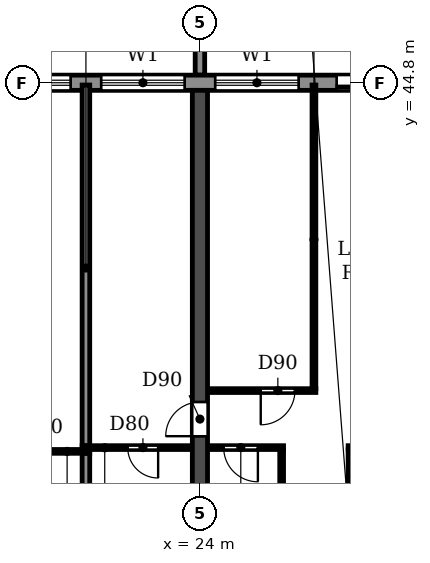
"""IFC4 building model, lengths in metres.
Left out: names, types, materials, properties, quantities, classifications, styles, units other than length and angle.
Written with IfcOpenShell. Run it as: python <this file> out.ifc"""

import sys

from ifc_helpers import new_model, si_unit, direction, frame, frame_2d, origin, place, context, subcontext, project, spatial, polyline, rectangle, outline, extrude, source, transform, mapped, element, fill, save


model = new_model("IFC4")
c1 = context("Model", 3, precision=1e-05, world=origin(), true_north=direction((0.0, 1.0)))
c2 = subcontext(c1, "Body", "Model", "MODEL_VIEW")
j1 = project(units=[si_unit("LENGTHUNIT", "METRE"), si_unit("PLANEANGLEUNIT", "RADIAN")], contexts=[c1])
p1 = place(None, origin())
s1 = spatial("IfcSite", under=j1, at=p1, CompositionType="ELEMENT")
p2 = place(p1, origin())
s2 = spatial("IfcBuilding", under=s1, at=p2, CompositionType="ELEMENT")
p3 = place(p2, frame((0.0, 0.0, 33.3)))
s3 = spatial("IfcBuildingStorey", under=s2, at=p3, CompositionType="ELEMENT", Elevation=33.3)
p4 = place(p3, frame((24.0, 30.55, 0.0), z_axis=(0.0, 0.0, 1.0), x_axis=(0.0, 1.0, 0.0)))
e1 = element("IfcWall", 1, at=p4, inside=s3, PredefinedType="SHEAR", context=c2, shape_type="SweptSolid", body=[
    extrude(rectangle(XDim=14.05, YDim=0.4, at=frame_2d((7.025, 0.0))), origin(), (0.0, 0.0, 1.0), 3.05),
])
p5 = place(p4, frame((4.95, 0.0, 0.0)))
e2 = element("IfcOpeningElement", 2, at=p5, cuts=e1, PredefinedType="OPENING", context=c2, shape_type="SweptSolid", body=[
    extrude(rectangle(XDim=0.9, YDim=2.1, at=frame_2d((0.45, 1.05))), frame((0.0, 0.21, 0.0), z_axis=(0.0, -1.0, 0.0), x_axis=(1.0, 0.0, 0.0)), (0.0, 0.0, 1.0), 0.42),
])
p6 = place(p3, frame((97.317, 44.8, 0.0), z_axis=(0.0, 0.0, 1.0), x_axis=(-1.0, 0.0, 0.0)))
e3 = element("IfcWall", 3, at=p6, inside=s3, PredefinedType="STANDARD", context=c2, shape_type="SweptSolid", body=[
    extrude(rectangle(XDim=92.634, YDim=0.4, at=frame_2d((46.317, 0.0))), origin(), (0.0, 0.0, 1.0), 3.05),
])
p7 = place(p6, frame((88.717, 0.0, 0.9)))
e4 = element("IfcOpeningElement", 4, at=p7, cuts=e3, PredefinedType="OPENING", context=c2, shape_type="SweptSolid", body=[
    extrude(rectangle(XDim=2.2, YDim=1.5, at=frame_2d((1.1, 0.75))), frame((0.0, 0.21, 0.0), z_axis=(0.0, -1.0, 0.0), x_axis=(1.0, 0.0, 0.0)), (0.0, 0.0, 1.0), 0.42),
])
p8 = place(p6, frame((85.917, 0.0, 0.0)))
e5 = element("IfcOpeningElement", 5, at=p8, cuts=e3, PredefinedType="OPENING", context=c2, shape_type="SweptSolid", body=[
    extrude(rectangle(XDim=1.8, YDim=2.4, at=frame_2d((0.9, 1.2))), frame((0.0, 0.21, 0.0), z_axis=(0.0, -1.0, 0.0), x_axis=(1.0, 0.0, 0.0)), (0.0, 0.0, 1.0), 0.42),
])
p9 = place(p6, frame((82.717, 0.0, 0.9)))
e6 = element("IfcOpeningElement", 6, at=p9, cuts=e3, PredefinedType="OPENING", context=c2, shape_type="SweptSolid", body=[
    extrude(rectangle(XDim=2.2, YDim=1.5, at=frame_2d((1.1, 0.75))), frame((0.0, 0.21, 0.0), z_axis=(0.0, -1.0, 0.0), x_axis=(1.0, 0.0, 0.0)), (0.0, 0.0, 1.0), 0.42),
])
p10 = place(p6, frame((79.917, 0.0, 0.0)))
e7 = element("IfcOpeningElement", 7, at=p10, cuts=e3, PredefinedType="OPENING", context=c2, shape_type="SweptSolid", body=[
    extrude(rectangle(XDim=1.8, YDim=2.4, at=frame_2d((0.9, 1.2))), frame((0.0, 0.21, 0.0), z_axis=(0.0, -1.0, 0.0), x_axis=(1.0, 0.0, 0.0)), (0.0, 0.0, 1.0), 0.42),
])
p11 = place(p6, frame((76.717, 0.0, 0.9)))
e8 = element("IfcOpeningElement", 8, at=p11, cuts=e3, PredefinedType="OPENING", context=c2, shape_type="SweptSolid", body=[
    extrude(rectangle(XDim=2.2, YDim=1.5, at=frame_2d((1.1, 0.75))), frame((0.0, 0.21, 0.0), z_axis=(0.0, -1.0, 0.0), x_axis=(1.0, 0.0, 0.0)), (0.0, 0.0, 1.0), 0.42),
])
p12 = place(p6, frame((73.717, 0.0, 0.9)))
e9 = element("IfcOpeningElement", 9, at=p12, cuts=e3, PredefinedType="OPENING", context=c2, shape_type="SweptSolid", body=[
    extrude(rectangle(XDim=2.2, YDim=1.5, at=frame_2d((1.1, 0.75))), frame((0.0, 0.21, 0.0), z_axis=(0.0, -1.0, 0.0), x_axis=(1.0, 0.0, 0.0)), (0.0, 0.0, 1.0), 0.42),
])
p13 = place(p6, frame((70.717, 0.0, 0.9)))
e10 = element("IfcOpeningElement", 10, at=p13, cuts=e3, PredefinedType="OPENING", context=c2, shape_type="SweptSolid", body=[
    extrude(rectangle(XDim=2.2, YDim=1.5, at=frame_2d((1.1, 0.75))), frame((0.0, 0.21, 0.0), z_axis=(0.0, -1.0, 0.0), x_axis=(1.0, 0.0, 0.0)), (0.0, 0.0, 1.0), 0.42),
])
p14 = place(p6, frame((67.917, 0.0, 0.0)))
e11 = element("IfcOpeningElement", 11, at=p14, cuts=e3, PredefinedType="OPENING", context=c2, shape_type="SweptSolid", body=[
    extrude(rectangle(XDim=1.8, YDim=2.4, at=frame_2d((0.9, 1.2))), frame((0.0, 0.21, 0.0), z_axis=(0.0, -1.0, 0.0), x_axis=(1.0, 0.0, 0.0)), (0.0, 0.0, 1.0), 0.42),
])
p15 = place(p6, frame((64.717, 0.0, 0.9)))
e12 = element("IfcOpeningElement", 12, at=p15, cuts=e3, PredefinedType="OPENING", context=c2, shape_type="SweptSolid", body=[
    extrude(rectangle(XDim=2.2, YDim=1.5, at=frame_2d((1.1, 0.75))), frame((0.0, 0.21, 0.0), z_axis=(0.0, -1.0, 0.0), x_axis=(1.0, 0.0, 0.0)), (0.0, 0.0, 1.0), 0.42),
])
p16 = place(p6, frame((61.717, 0.0, 0.9)))
e13 = element("IfcOpeningElement", 13, at=p16, cuts=e3, PredefinedType="OPENING", context=c2, shape_type="SweptSolid", body=[
    extrude(rectangle(XDim=2.2, YDim=1.5, at=frame_2d((1.1, 0.75))), frame((0.0, 0.21, 0.0), z_axis=(0.0, -1.0, 0.0), x_axis=(1.0, 0.0, 0.0)), (0.0, 0.0, 1.0), 0.42),
])
p17 = place(p6, frame((58.717, 0.0, 0.9)))
e14 = element("IfcOpeningElement", 14, at=p17, cuts=e3, PredefinedType="OPENING", context=c2, shape_type="SweptSolid", body=[
    extrude(rectangle(XDim=2.2, YDim=1.5, at=frame_2d((1.1, 0.75))), frame((0.0, 0.21, 0.0), z_axis=(0.0, -1.0, 0.0), x_axis=(1.0, 0.0, 0.0)), (0.0, 0.0, 1.0), 0.42),
])
p18 = place(p6, frame((55.917, 0.0, 0.0)))
e15 = element("IfcOpeningElement", 15, at=p18, cuts=e3, PredefinedType="OPENING", context=c2, shape_type="SweptSolid", body=[
    extrude(rectangle(XDim=1.8, YDim=2.4, at=frame_2d((0.9, 1.2))), frame((0.0, 0.21, 0.0), z_axis=(0.0, -1.0, 0.0), x_axis=(1.0, 0.0, 0.0)), (0.0, 0.0, 1.0), 0.42),
])
p19 = place(p6, frame((52.717, 0.0, 0.9)))
e16 = element("IfcOpeningElement", 16, at=p19, cuts=e3, PredefinedType="OPENING", context=c2, shape_type="SweptSolid", body=[
    extrude(rectangle(XDim=2.2, YDim=1.5, at=frame_2d((1.1, 0.75))), frame((0.0, 0.21, 0.0), z_axis=(0.0, -1.0, 0.0), x_axis=(1.0, 0.0, 0.0)), (0.0, 0.0, 1.0), 0.42),
])
p20 = place(p6, frame((49.717, 0.0, 0.9)))
e17 = element("IfcOpeningElement", 17, at=p20, cuts=e3, PredefinedType="OPENING", context=c2, shape_type="SweptSolid", body=[
    extrude(rectangle(XDim=2.2, YDim=1.5, at=frame_2d((1.1, 0.75))), frame((0.0, 0.21, 0.0), z_axis=(0.0, -1.0, 0.0), x_axis=(1.0, 0.0, 0.0)), (0.0, 0.0, 1.0), 0.42),
])
p21 = place(p6, frame((46.717, 0.0, 0.9)))
e18 = element("IfcOpeningElement", 18, at=p21, cuts=e3, PredefinedType="OPENING", context=c2, shape_type="SweptSolid", body=[
    extrude(rectangle(XDim=2.2, YDim=1.5, at=frame_2d((1.1, 0.75))), frame((0.0, 0.21, 0.0), z_axis=(0.0, -1.0, 0.0), x_axis=(1.0, 0.0, 0.0)), (0.0, 0.0, 1.0), 0.42),
])
p22 = place(p6, frame((43.917, 0.0, 0.0)))
e19 = element("IfcOpeningElement", 19, at=p22, cuts=e3, PredefinedType="OPENING", context=c2, shape_type="SweptSolid", body=[
    extrude(rectangle(XDim=1.8, YDim=2.4, at=frame_2d((0.9, 1.2))), frame((0.0, 0.21, 0.0), z_axis=(0.0, -1.0, 0.0), x_axis=(1.0, 0.0, 0.0)), (0.0, 0.0, 1.0), 0.42),
])
p23 = place(p6, frame((40.717, 0.0, 0.9)))
e20 = element("IfcOpeningElement", 20, at=p23, cuts=e3, PredefinedType="OPENING", context=c2, shape_type="SweptSolid", body=[
    extrude(rectangle(XDim=2.2, YDim=1.5, at=frame_2d((1.1, 0.75))), frame((0.0, 0.21, 0.0), z_axis=(0.0, -1.0, 0.0), x_axis=(1.0, 0.0, 0.0)), (0.0, 0.0, 1.0), 0.42),
])
p24 = place(p6, frame((37.717, 0.0, 0.9)))
e21 = element("IfcOpeningElement", 21, at=p24, cuts=e3, PredefinedType="OPENING", context=c2, shape_type="SweptSolid", body=[
    extrude(rectangle(XDim=2.2, YDim=1.5, at=frame_2d((1.1, 0.75))), frame((0.0, 0.21, 0.0), z_axis=(0.0, -1.0, 0.0), x_axis=(1.0, 0.0, 0.0)), (0.0, 0.0, 1.0), 0.42),
])
p25 = place(p6, frame((34.717, 0.0, 0.9)))
e22 = element("IfcOpeningElement", 22, at=p25, cuts=e3, PredefinedType="OPENING", context=c2, shape_type="SweptSolid", body=[
    extrude(rectangle(XDim=2.2, YDim=1.5, at=frame_2d((1.1, 0.75))), frame((0.0, 0.21, 0.0), z_axis=(0.0, -1.0, 0.0), x_axis=(1.0, 0.0, 0.0)), (0.0, 0.0, 1.0), 0.42),
])
p26 = place(p6, frame((31.917, 0.0, 0.0)))
e23 = element("IfcOpeningElement", 23, at=p26, cuts=e3, PredefinedType="OPENING", context=c2, shape_type="SweptSolid", body=[
    extrude(rectangle(XDim=1.8, YDim=2.4, at=frame_2d((0.9, 1.2))), frame((0.0, 0.21, 0.0), z_axis=(0.0, -1.0, 0.0), x_axis=(1.0, 0.0, 0.0)), (0.0, 0.0, 1.0), 0.42),
])
p27 = place(p6, frame((28.717, 0.0, 0.9)))
e24 = element("IfcOpeningElement", 24, at=p27, cuts=e3, PredefinedType="OPENING", context=c2, shape_type="SweptSolid", body=[
    extrude(rectangle(XDim=2.2, YDim=1.5, at=frame_2d((1.1, 0.75))), frame((0.0, 0.21, 0.0), z_axis=(0.0, -1.0, 0.0), x_axis=(1.0, 0.0, 0.0)), (0.0, 0.0, 1.0), 0.42),
])
p28 = place(p6, frame((25.717, 0.0, 0.9)))
e25 = element("IfcOpeningElement", 25, at=p28, cuts=e3, PredefinedType="OPENING", context=c2, shape_type="SweptSolid", body=[
    extrude(rectangle(XDim=2.2, YDim=1.5, at=frame_2d((1.1, 0.75))), frame((0.0, 0.21, 0.0), z_axis=(0.0, -1.0, 0.0), x_axis=(1.0, 0.0, 0.0)), (0.0, 0.0, 1.0), 0.42),
])
p29 = place(p6, frame((22.917, 0.0, 0.0)))
e26 = element("IfcOpeningElement", 26, at=p29, cuts=e3, PredefinedType="OPENING", context=c2, shape_type="SweptSolid", body=[
    extrude(rectangle(XDim=1.8, YDim=2.4, at=frame_2d((0.9, 1.2))), frame((0.0, 0.21, 0.0), z_axis=(0.0, -1.0, 0.0), x_axis=(1.0, 0.0, 0.0)), (0.0, 0.0, 1.0), 0.42),
])
p30 = place(p6, frame((19.717, 0.0, 0.9)))
e27 = element("IfcOpeningElement", 27, at=p30, cuts=e3, PredefinedType="OPENING", context=c2, shape_type="SweptSolid", body=[
    extrude(rectangle(XDim=2.2, YDim=1.5, at=frame_2d((1.1, 0.75))), frame((0.0, 0.21, 0.0), z_axis=(0.0, -1.0, 0.0), x_axis=(1.0, 0.0, 0.0)), (0.0, 0.0, 1.0), 0.42),
])
p31 = place(p6, frame((16.717, 0.0, 0.9)))
e28 = element("IfcOpeningElement", 28, at=p31, cuts=e3, PredefinedType="OPENING", context=c2, shape_type="SweptSolid", body=[
    extrude(rectangle(XDim=2.2, YDim=1.5, at=frame_2d((1.1, 0.75))), frame((0.0, 0.21, 0.0), z_axis=(0.0, -1.0, 0.0), x_axis=(1.0, 0.0, 0.0)), (0.0, 0.0, 1.0), 0.42),
])
p32 = place(p6, frame((13.917, 0.0, 0.0)))
e29 = element("IfcOpeningElement", 29, at=p32, cuts=e3, PredefinedType="OPENING", context=c2, shape_type="SweptSolid", body=[
    extrude(rectangle(XDim=1.8, YDim=2.4, at=frame_2d((0.9, 1.2))), frame((0.0, 0.21, 0.0), z_axis=(0.0, -1.0, 0.0), x_axis=(1.0, 0.0, 0.0)), (0.0, 0.0, 1.0), 0.42),
])
p33 = place(p6, frame((10.717, 0.0, 0.9)))
e30 = element("IfcOpeningElement", 30, at=p33, cuts=e3, PredefinedType="OPENING", context=c2, shape_type="SweptSolid", body=[
    extrude(rectangle(XDim=2.2, YDim=1.5, at=frame_2d((1.1, 0.75))), frame((0.0, 0.21, 0.0), z_axis=(0.0, -1.0, 0.0), x_axis=(1.0, 0.0, 0.0)), (0.0, 0.0, 1.0), 0.42),
])
p34 = place(p6, frame((7.917, 0.0, 0.0)))
e31 = element("IfcOpeningElement", 31, at=p34, cuts=e3, PredefinedType="OPENING", context=c2, shape_type="SweptSolid", body=[
    extrude(rectangle(XDim=1.8, YDim=2.4, at=frame_2d((0.9, 1.2))), frame((0.0, 0.21, 0.0), z_axis=(0.0, -1.0, 0.0), x_axis=(1.0, 0.0, 0.0)), (0.0, 0.0, 1.0), 0.42),
])
p35 = place(p6, frame((4.717, 0.0, 0.9)))
e32 = element("IfcOpeningElement", 32, at=p35, cuts=e3, PredefinedType="OPENING", context=c2, shape_type="SweptSolid", body=[
    extrude(rectangle(XDim=2.2, YDim=1.5, at=frame_2d((1.1, 0.75))), frame((0.0, 0.21, 0.0), z_axis=(0.0, -1.0, 0.0), x_axis=(1.0, 0.0, 0.0)), (0.0, 0.0, 1.0), 0.42),
])
p36 = place(p6, frame((1.917, 0.0, 0.0)))
e33 = element("IfcOpeningElement", 33, at=p36, cuts=e3, PredefinedType="OPENING", context=c2, shape_type="SweptSolid", body=[
    extrude(rectangle(XDim=1.8, YDim=2.4, at=frame_2d((0.9, 1.2))), frame((0.0, 0.21, 0.0), z_axis=(0.0, -1.0, 0.0), x_axis=(1.0, 0.0, 0.0)), (0.0, 0.0, 1.0), 0.42),
])
m1 = source(origin(), c2, "Body", "SweptSolid", [
    extrude(outline(polyline([(0.0, 0.0), (0.25, 0.0), (0.25, 3.1), (0.0, 3.1), (0.0, 0.0)])), origin(), (0.0, 0.0, 1.0), 3.1),
])
p37 = place(p3, frame((23.875, 45.0, 0.0)))
e34 = element("IfcWall", 34, at=p37, inside=s3, PredefinedType="STANDARD", context=c2, shape_type="MappedRepresentation", body=[
    mapped(m1, transform((0.0, 0.0, 0.0))),
])
p38 = place(p3, frame((21.0, 30.56, 0.0), z_axis=(0.0, 0.0, 1.0), x_axis=(0.0, 1.0, 0.0)))
e35 = element("IfcWall", 35, at=p38, inside=s3, PredefinedType="PARTITIONING", context=c2, shape_type="SweptSolid", body=[
    extrude(rectangle(XDim=4.49, YDim=0.2, at=frame_2d((2.245, 0.0))), origin(), (0.0, 0.0, 1.0), 3.05),
])
p39 = place(p3, frame((21.0, 35.25, 0.0), z_axis=(0.0, 0.0, 1.0), x_axis=(0.0, 1.0, 0.0)))
e36 = element("IfcWall", 36, at=p39, inside=s3, PredefinedType="PARTITIONING", context=c2, shape_type="SweptSolid", body=[
    extrude(rectangle(XDim=9.49, YDim=0.2, at=frame_2d((4.745, 0.0))), origin(), (0.0, 0.0, 1.0), 3.05),
])
p40 = place(p3, frame((18.21, 35.1, 0.0), z_axis=(0.0, 0.0, 1.0), x_axis=(1.0, 0.0, 0.0)))
e37 = element("IfcWall", 37, at=p40, inside=s3, PredefinedType="PARTITIONING", context=c2, shape_type="SweptSolid", body=[
    extrude(rectangle(XDim=2.89, YDim=0.1, at=frame_2d((1.445, 0.0))), origin(), (0.0, 0.0, 1.0), 3.05),
])
p41 = place(p40, frame((0.89, 0.0, 0.0)))
e38 = element("IfcOpeningElement", 38, at=p41, cuts=e37, PredefinedType="OPENING", context=c2, shape_type="SweptSolid", body=[
    extrude(rectangle(XDim=0.8, YDim=2.1, at=frame_2d((0.4, 1.05))), frame((0.0, 0.06, 0.0), z_axis=(0.0, -1.0, 0.0), x_axis=(1.0, 0.0, 0.0)), (0.0, 0.0, 1.0), 0.12),
])
p42 = place(p3, frame((20.9, 35.2, 0.0), z_axis=(0.0, 0.0, 1.0), x_axis=(1.0, 0.0, 0.0)))
e39 = element("IfcWall", 39, at=p42, inside=s3, PredefinedType="PARTITIONING", context=c2, shape_type="SweptSolid", body=[
    extrude(rectangle(XDim=2.89, YDim=0.1, at=frame_2d((1.445, 0.0))), origin(), (0.0, 0.0, 1.0), 3.05),
])
p43 = place(p42, frame((1.2, 0.0, 0.0)))
e40 = element("IfcOpeningElement", 40, at=p43, cuts=e39, PredefinedType="OPENING", context=c2, shape_type="SweptSolid", body=[
    extrude(rectangle(XDim=0.8, YDim=2.1, at=frame_2d((0.4, 1.05))), frame((0.0, 0.06, 0.0), z_axis=(0.0, -1.0, 0.0), x_axis=(1.0, 0.0, 0.0)), (0.0, 0.0, 1.0), 0.12),
])
p44 = place(p3, frame((24.21, 35.2, 0.0), z_axis=(0.0, 0.0, 1.0), x_axis=(1.0, 0.0, 0.0)))
e41 = element("IfcWall", 41, at=p44, inside=s3, PredefinedType="PARTITIONING", context=c2, shape_type="SweptSolid", body=[
    extrude(rectangle(XDim=1.99, YDim=0.1, at=frame_2d((0.995, 0.0))), origin(), (0.0, 0.0, 1.0), 3.05),
])
p45 = place(p44, frame((0.415, 0.0, 0.0)))
e42 = element("IfcOpeningElement", 42, at=p45, cuts=e41, PredefinedType="OPENING", context=c2, shape_type="SweptSolid", body=[
    extrude(rectangle(XDim=0.9, YDim=2.1, at=frame_2d((0.45, 1.05))), frame((0.0, 0.06, 0.0), z_axis=(0.0, -1.0, 0.0), x_axis=(1.0, 0.0, 0.0)), (0.0, 0.0, 1.0), 0.12),
])
p46 = place(p3, frame((27.9, 35.2, 0.0), z_axis=(0.0, 0.0, 1.0), x_axis=(1.0, 0.0, 0.0)))
e43 = element("IfcWall", 43, at=p46, inside=s3, PredefinedType="PARTITIONING", context=c2, shape_type="SweptSolid", body=[
    extrude(rectangle(XDim=1.89, YDim=0.1, at=frame_2d((0.945, 0.0))), origin(), (0.0, 0.0, 1.0), 3.05),
])
p47 = place(p46, frame((0.675, 0.0, 0.0)))
e44 = element("IfcOpeningElement", 44, at=p47, cuts=e43, PredefinedType="OPENING", context=c2, shape_type="SweptSolid", body=[
    extrude(rectangle(XDim=0.8, YDim=2.1, at=frame_2d((0.4, 1.05))), frame((0.0, 0.06, 0.0), z_axis=(0.0, -1.0, 0.0), x_axis=(1.0, 0.0, 0.0)), (0.0, 0.0, 1.0), 0.12),
])
p48 = place(p3, frame((24.21, 36.7, 0.0), z_axis=(0.0, 0.0, 1.0), x_axis=(1.0, 0.0, 0.0)))
e45 = element("IfcWall", 45, at=p48, inside=s3, PredefinedType="PARTITIONING", context=c2, shape_type="SweptSolid", body=[
    extrude(rectangle(XDim=2.84, YDim=0.1, at=frame_2d((1.42, 0.0))), origin(), (0.0, 0.0, 1.0), 3.05),
])
p49 = place(p48, frame((1.39, 0.0, 0.0)))
e46 = element("IfcOpeningElement", 46, at=p49, cuts=e45, PredefinedType="OPENING", context=c2, shape_type="SweptSolid", body=[
    extrude(rectangle(XDim=0.9, YDim=2.1, at=frame_2d((0.45, 1.05))), frame((0.0, 0.06, 0.0), z_axis=(0.0, -1.0, 0.0), x_axis=(1.0, 0.0, 0.0)), (0.0, 0.0, 1.0), 0.12),
])
p50 = place(p3, frame((26.15, 30.56, 0.0), z_axis=(0.0, 0.0, 1.0), x_axis=(0.0, 1.0, 0.0)))
e47 = element("IfcWall", 47, at=p50, inside=s3, PredefinedType="PARTITIONING", context=c2, shape_type="SweptSolid", body=[
    extrude(rectangle(XDim=4.59, YDim=0.1, at=frame_2d((2.295, 0.0))), origin(), (0.0, 0.0, 1.0), 3.05),
])
p51 = place(p3, frame((27.0, 36.75, 0.0), z_axis=(0.0, 0.0, 1.0), x_axis=(0.0, 1.0, 0.0)))
e48 = element("IfcWall", 48, at=p51, inside=s3, PredefinedType="PARTITIONING", context=c2, shape_type="SweptSolid", body=[
    extrude(rectangle(XDim=7.99, YDim=0.1, at=frame_2d((3.995, 0.0))), origin(), (0.0, 0.0, 1.0), 3.05),
])
p52 = place(p3, frame((27.95, 30.56, 0.0), z_axis=(0.0, 0.0, 1.0), x_axis=(0.0, 1.0, 0.0)))
e49 = element("IfcWall", 49, at=p52, inside=s3, PredefinedType="PARTITIONING", context=c2, shape_type="SweptSolid", body=[
    extrude(rectangle(XDim=4.59, YDim=0.1, at=frame_2d((2.295, 0.0))), origin(), (0.0, 0.0, 1.0), 3.05),
])
p53 = place(p11, origin())
e50 = element("IfcWindow", 50, at=p53, inside=s3, PartitioningType="DOUBLE_PANEL_HORIZONTAL", PredefinedType="WINDOW", context=c2, shape_type="SweptSolid", body=[
    extrude(rectangle(XDim=2.2, YDim=1.5, at=frame_2d((1.1, 0.75))), frame((0.0, 0.03, 0.0), z_axis=(0.0, -1.0, 0.0), x_axis=(1.0, 0.0, 0.0)), (0.0, 0.0, 1.0), 0.06),
])
fill(e8, e50)
p54 = place(p12, origin())
e51 = element("IfcWindow", 51, at=p54, inside=s3, PartitioningType="DOUBLE_PANEL_HORIZONTAL", PredefinedType="WINDOW", context=c2, shape_type="SweptSolid", body=[
    extrude(rectangle(XDim=2.2, YDim=1.5, at=frame_2d((1.1, 0.75))), frame((0.0, 0.03, 0.0), z_axis=(0.0, -1.0, 0.0), x_axis=(1.0, 0.0, 0.0)), (0.0, 0.0, 1.0), 0.06),
])
fill(e9, e51)
p55 = place(p13, origin())
e52 = element("IfcWindow", 52, at=p55, inside=s3, PartitioningType="DOUBLE_PANEL_HORIZONTAL", PredefinedType="WINDOW", context=c2, shape_type="SweptSolid", body=[
    extrude(rectangle(XDim=2.2, YDim=1.5, at=frame_2d((1.1, 0.75))), frame((0.0, 0.03, 0.0), z_axis=(0.0, -1.0, 0.0), x_axis=(1.0, 0.0, 0.0)), (0.0, 0.0, 1.0), 0.06),
])
fill(e10, e52)
p56 = place(p14, origin())
e53 = element("IfcDoor", 53, at=p56, inside=s3, OperationType="DOUBLE_DOOR_SLIDING", PredefinedType="DOOR", context=c2, shape_type="SweptSolid", body=[
    extrude(rectangle(XDim=1.8, YDim=2.4, at=frame_2d((0.9, 1.2))), frame((0.0, 0.025, 0.0), z_axis=(0.0, -1.0, 0.0), x_axis=(1.0, 0.0, 0.0)), (0.0, 0.0, 1.0), 0.05),
])
fill(e11, e53)
p57 = place(p43, frame((0.8, 0.0, 0.0), z_axis=(0.0, 0.0, 1.0), x_axis=(-1.0, 0.0, 0.0)))
e54 = element("IfcDoor", 54, at=p57, inside=s3, OperationType="SINGLE_SWING_LEFT", PredefinedType="DOOR", context=c2, shape_type="SweptSolid", body=[
    extrude(rectangle(XDim=0.8, YDim=2.1, at=frame_2d((0.4, 1.05))), frame((0.0, 0.025, 0.0), z_axis=(0.0, -1.0, 0.0), x_axis=(1.0, 0.0, 0.0)), (0.0, 0.0, 1.0), 0.05),
])
fill(e40, e54)
p58 = place(p5, origin())
e55 = element("IfcDoor", 55, at=p58, inside=s3, OperationType="SINGLE_SWING_LEFT", PredefinedType="DOOR", context=c2, shape_type="SweptSolid", body=[
    extrude(rectangle(XDim=0.9, YDim=2.1, at=frame_2d((0.45, 1.05))), frame((0.0, 0.025, 0.0), z_axis=(0.0, -1.0, 0.0), x_axis=(1.0, 0.0, 0.0)), (0.0, 0.0, 1.0), 0.05),
])
fill(e2, e55)
p59 = place(p45, frame((0.9, 0.0, 0.0), z_axis=(0.0, 0.0, 1.0), x_axis=(-1.0, 0.0, 0.0)))
e56 = element("IfcDoor", 56, at=p59, inside=s3, OperationType="SINGLE_SWING_LEFT", PredefinedType="DOOR", context=c2, shape_type="SweptSolid", body=[
    extrude(rectangle(XDim=0.9, YDim=2.1, at=frame_2d((0.45, 1.05))), frame((0.0, 0.025, 0.0), z_axis=(0.0, -1.0, 0.0), x_axis=(1.0, 0.0, 0.0)), (0.0, 0.0, 1.0), 0.05),
])
fill(e42, e56)
p60 = place(p49, frame((0.9, 0.0, 0.0), z_axis=(0.0, 0.0, 1.0), x_axis=(-1.0, 0.0, 0.0)))
e57 = element("IfcDoor", 57, at=p60, inside=s3, OperationType="SINGLE_SWING_RIGHT", PredefinedType="DOOR", context=c2, shape_type="SweptSolid", body=[
    extrude(rectangle(XDim=0.9, YDim=2.1, at=frame_2d((0.45, 1.05))), frame((0.0, 0.025, 0.0), z_axis=(0.0, -1.0, 0.0), x_axis=(1.0, 0.0, 0.0)), (0.0, 0.0, 1.0), 0.05),
])
fill(e46, e57)
save(model, sys.argv[1])
